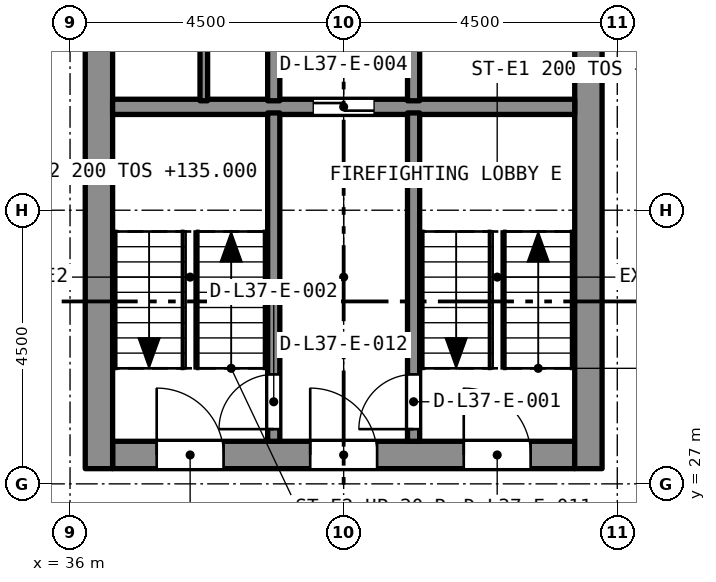
"""IFC4 building model, lengths in metres.
Left out: names, types, materials, properties, quantities, classifications, styles, units other than length and angle.
Written with IfcOpenShell. Run it as: python <this file> out.ifc"""

import sys

from ifc_helpers import new_model, si_unit, direction, frame, frame_2d, origin, place, context, subcontext, project, spatial, rectangle, extrude, element, fill, save


model = new_model("IFC4")
c1 = context("Model", 3, precision=1e-05, world=origin(), true_north=direction((0.0, 1.0)))
c2 = subcontext(c1, "Body", "Model", "MODEL_VIEW")
j1 = project(units=[si_unit("LENGTHUNIT", "METRE"), si_unit("PLANEANGLEUNIT", "RADIAN")], contexts=[c1])
p1 = place(None, origin())
s1 = spatial("IfcSite", under=j1, at=p1, CompositionType="ELEMENT")
p2 = place(p1, origin())
s2 = spatial("IfcBuilding", under=s1, at=p2, CompositionType="ELEMENT")
p3 = place(p2, frame((0.0, 0.0, 133.4)))
s3 = spatial("IfcBuildingStorey", under=s2, at=p3, CompositionType="ELEMENT", Elevation=133.4)
p4 = place(p3, frame((36.7, 27.475, 0.0), z_axis=(0.0, 0.0, 1.0), x_axis=(1.0, 0.0, 0.0)))
e1 = element("IfcWall", 1, at=p4, inside=s3, PredefinedType="SOLIDWALL", context=c2, shape_type="SweptSolid", body=[
    extrude(rectangle(XDim=7.6, YDim=0.45, at=frame_2d((3.8, 0.0))), origin(), (0.0, 0.0, 1.0), 3.2),
])
p5 = place(p4, frame((5.775, 0.0, 0.0)))
e2 = element("IfcOpeningElement", 2, at=p5, cuts=e1, PredefinedType="OPENING", context=c2, shape_type="SweptSolid", body=[
    extrude(rectangle(XDim=1.1, YDim=2.1, at=frame_2d((0.55, 1.05))), frame((0.0, 0.235, 0.0), z_axis=(0.0, -1.0, 0.0), x_axis=(1.0, 0.0, 0.0)), (0.0, 0.0, 1.0), 0.47),
])
p6 = place(p4, frame((3.25, 0.0, 0.0)))
e3 = element("IfcOpeningElement", 3, at=p6, cuts=e1, PredefinedType="OPENING", context=c2, shape_type="SweptSolid", body=[
    extrude(rectangle(XDim=1.1, YDim=2.1, at=frame_2d((0.55, 1.05))), frame((0.0, 0.235, 0.0), z_axis=(0.0, -1.0, 0.0), x_axis=(1.0, 0.0, 0.0)), (0.0, 0.0, 1.0), 0.47),
])
p7 = place(p4, frame((0.725, 0.0, 0.0)))
e4 = element("IfcOpeningElement", 4, at=p7, cuts=e1, PredefinedType="OPENING", context=c2, shape_type="SweptSolid", body=[
    extrude(rectangle(XDim=1.1, YDim=2.1, at=frame_2d((0.55, 1.05))), frame((0.0, 0.235, 0.0), z_axis=(0.0, -1.0, 0.0), x_axis=(1.0, 0.0, 0.0)), (0.0, 0.0, 1.0), 0.47),
])
p8 = place(p3, frame((36.475, 27.25, 0.0), z_axis=(0.0, 0.0, 1.0), x_axis=(0.0, 1.0, 0.0)))
e5 = element("IfcWall", 5, at=p8, inside=s3, PredefinedType="SOLIDWALL", context=c2, shape_type="SweptSolid", body=[
    extrude(rectangle(XDim=13.0, YDim=0.45, at=frame_2d((6.5, 0.0))), origin(), (0.0, 0.0, 1.0), 3.2),
])
p9 = place(p8, frame((8.7, 0.0, 0.0)))
e6 = element("IfcOpeningElement", 6, at=p9, cuts=e5, PredefinedType="OPENING", context=c2, shape_type="SweptSolid", body=[
    extrude(rectangle(XDim=1.2, YDim=2.1, at=frame_2d((0.6, 1.05))), frame((0.0, 0.235, 0.0), z_axis=(0.0, -1.0, 0.0), x_axis=(1.0, 0.0, 0.0)), (0.0, 0.0, 1.0), 0.47),
])
p10 = place(p3, frame((44.525, 27.25, 0.0), z_axis=(0.0, 0.0, 1.0), x_axis=(0.0, 1.0, 0.0)))
e7 = element("IfcWall", 7, at=p10, inside=s3, PredefinedType="SOLIDWALL", context=c2, shape_type="SweptSolid", body=[
    extrude(rectangle(XDim=13.0, YDim=0.45, at=frame_2d((6.5, 0.0))), origin(), (0.0, 0.0, 1.0), 3.2),
])
p11 = place(p10, frame((8.7, 0.0, 0.0)))
e8 = element("IfcOpeningElement", 8, at=p11, cuts=e7, PredefinedType="OPENING", context=c2, shape_type="SweptSolid", body=[
    extrude(rectangle(XDim=1.2, YDim=2.1, at=frame_2d((0.6, 1.05))), frame((0.0, 0.235, 0.0), z_axis=(0.0, -1.0, 0.0), x_axis=(1.0, 0.0, 0.0)), (0.0, 0.0, 1.0), 0.47),
])
p12 = place(p3, frame((36.7, 33.2, 0.0), z_axis=(0.0, 0.0, 1.0), x_axis=(1.0, 0.0, 0.0)))
e9 = element("IfcWall", 9, at=p12, inside=s3, PredefinedType="SOLIDWALL", context=c2, shape_type="SweptSolid", body=[
    extrude(rectangle(XDim=7.6, YDim=0.25, at=frame_2d((3.8, 0.0))), origin(), (0.0, 0.0, 1.0), 2.9),
])
p13 = place(p12, frame((3.3, 0.0, 0.0)))
e10 = element("IfcOpeningElement", 10, at=p13, cuts=e9, PredefinedType="OPENING", context=c2, shape_type="SweptSolid", body=[
    extrude(rectangle(XDim=1.0, YDim=2.1, at=frame_2d((0.5, 1.05))), frame((0.0, 0.135, 0.0), z_axis=(0.0, -1.0, 0.0), x_axis=(1.0, 0.0, 0.0)), (0.0, 0.0, 1.0), 0.27),
])
p14 = place(p3, frame((41.65, 27.7, 0.0), z_axis=(0.0, 0.0, 1.0), x_axis=(0.0, 1.0, 0.0)))
e11 = element("IfcWall", 11, at=p14, inside=s3, PredefinedType="SOLIDWALL", context=c2, shape_type="SweptSolid", body=[
    extrude(rectangle(XDim=5.4, YDim=0.2, at=frame_2d((2.7, 0.0))), origin(), (0.0, 0.0, 1.0), 2.9),
])
p15 = place(p14, frame((0.2, 0.0, 0.0)))
e12 = element("IfcOpeningElement", 12, at=p15, cuts=e11, PredefinedType="OPENING", context=c2, shape_type="SweptSolid", body=[
    extrude(rectangle(XDim=0.9, YDim=2.1, at=frame_2d((0.45, 1.05))), frame((0.0, 0.11, 0.0), z_axis=(0.0, -1.0, 0.0), x_axis=(1.0, 0.0, 0.0)), (0.0, 0.0, 1.0), 0.22),
])
p16 = place(p3, frame((39.35, 27.7, 0.0), z_axis=(0.0, 0.0, 1.0), x_axis=(0.0, 1.0, 0.0)))
e13 = element("IfcWall", 13, at=p16, inside=s3, PredefinedType="SOLIDWALL", context=c2, shape_type="SweptSolid", body=[
    extrude(rectangle(XDim=5.4, YDim=0.2, at=frame_2d((2.7, 0.0))), origin(), (0.0, 0.0, 1.0), 2.9),
])
p17 = place(p16, frame((0.2, 0.0, 0.0)))
e14 = element("IfcOpeningElement", 14, at=p17, cuts=e13, PredefinedType="OPENING", context=c2, shape_type="SweptSolid", body=[
    extrude(rectangle(XDim=0.9, YDim=2.1, at=frame_2d((0.45, 1.05))), frame((0.0, 0.11, 0.0), z_axis=(0.0, -1.0, 0.0), x_axis=(1.0, 0.0, 0.0)), (0.0, 0.0, 1.0), 0.22),
])
for number, where, z_axis, x_axis in (
    (15, (41.65, 33.3, 0.0), (0.0, 0.0, 1.0), (0.0, 1.0, 0.0)),
    (16, (39.35, 33.3, 0.0), (0.0, 0.0, 1.0), (0.0, 1.0, 0.0)),
):
    element("IfcWall", number, at=place(p3, frame(where, z_axis=z_axis, x_axis=x_axis)), inside=s3, PredefinedType="SOLIDWALL", context=c2, shape_type="SweptSolid", body=[
        extrude(rectangle(XDim=2.3, YDim=0.2, at=frame_2d((1.15, 0.0))), origin(), (0.0, 0.0, 1.0), 2.9),
    ])
p18 = place(p3, frame((38.2, 33.3, 0.0), z_axis=(0.0, 0.0, 1.0), x_axis=(0.0, 1.0, 0.0)))
e17 = element("IfcWall", 17, at=p18, inside=s3, PredefinedType="PARTITIONING", context=c2, shape_type="SweptSolid", body=[
    extrude(rectangle(XDim=2.3, YDim=0.125, at=frame_2d((1.15, 0.0))), origin(), (0.0, 0.0, 1.0), 2.9),
])
p19 = place(p15, origin())
e18 = element("IfcDoor", 18, at=p19, inside=s3, OperationType="SINGLE_SWING_LEFT", PredefinedType="DOOR", context=c2, shape_type="SweptSolid", body=[
    extrude(rectangle(XDim=0.9, YDim=2.1, at=frame_2d((0.45, 1.05))), frame((0.0, 0.025, 0.0), z_axis=(0.0, -1.0, 0.0), x_axis=(1.0, 0.0, 0.0)), (0.0, 0.0, 1.0), 0.05),
])
fill(e12, e18)
p20 = place(p17, origin())
e19 = element("IfcDoor", 19, at=p20, inside=s3, OperationType="SINGLE_SWING_LEFT", PredefinedType="DOOR", context=c2, shape_type="SweptSolid", body=[
    extrude(rectangle(XDim=0.9, YDim=2.1, at=frame_2d((0.45, 1.05))), frame((0.0, 0.025, 0.0), z_axis=(0.0, -1.0, 0.0), x_axis=(1.0, 0.0, 0.0)), (0.0, 0.0, 1.0), 0.05),
])
fill(e14, e19)
p21 = place(p13, origin())
e20 = element("IfcDoor", 20, at=p21, inside=s3, OperationType="SLIDING_TO_LEFT", PredefinedType="DOOR", context=c2, shape_type="SweptSolid", body=[
    extrude(rectangle(XDim=1.0, YDim=2.1, at=frame_2d((0.5, 1.05))), frame((0.0, 0.025, 0.0), z_axis=(0.0, -1.0, 0.0), x_axis=(1.0, 0.0, 0.0)), (0.0, 0.0, 1.0), 0.05),
])
fill(e10, e20)
p22 = place(p5, origin())
e21 = element("IfcDoor", 21, at=p22, inside=s3, OperationType="SINGLE_SWING_LEFT", PredefinedType="DOOR", context=c2, shape_type="SweptSolid", body=[
    extrude(rectangle(XDim=1.1, YDim=2.1, at=frame_2d((0.55, 1.05))), frame((0.0, 0.025, 0.0), z_axis=(0.0, -1.0, 0.0), x_axis=(1.0, 0.0, 0.0)), (0.0, 0.0, 1.0), 0.05),
])
fill(e2, e21)
p23 = place(p6, origin())
e22 = element("IfcDoor", 22, at=p23, inside=s3, OperationType="SINGLE_SWING_LEFT", PredefinedType="DOOR", context=c2, shape_type="SweptSolid", body=[
    extrude(rectangle(XDim=1.1, YDim=2.1, at=frame_2d((0.55, 1.05))), frame((0.0, 0.025, 0.0), z_axis=(0.0, -1.0, 0.0), x_axis=(1.0, 0.0, 0.0)), (0.0, 0.0, 1.0), 0.05),
])
fill(e3, e22)
p24 = place(p7, origin())
e23 = element("IfcDoor", 23, at=p24, inside=s3, OperationType="SINGLE_SWING_LEFT", PredefinedType="DOOR", context=c2, shape_type="SweptSolid", body=[
    extrude(rectangle(XDim=1.1, YDim=2.1, at=frame_2d((0.55, 1.05))), frame((0.0, 0.025, 0.0), z_axis=(0.0, -1.0, 0.0), x_axis=(1.0, 0.0, 0.0)), (0.0, 0.0, 1.0), 0.05),
])
fill(e4, e23)
save(model, sys.argv[1])
